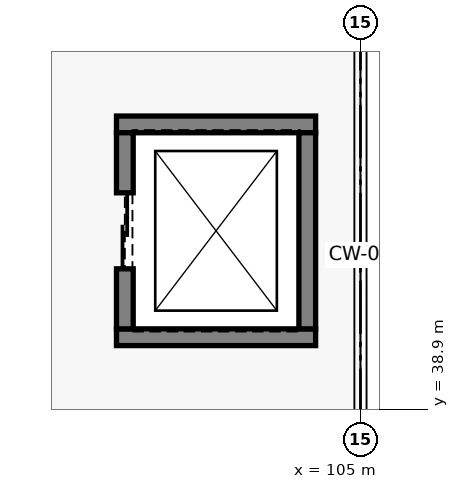
"""IFC4 building model, lengths in metres.
Left out: names, types, materials, properties, quantities, classifications, styles, units other than length and angle.
Written with IfcOpenShell. Run it as: python <this file> out.ifc"""

import sys

from ifc_helpers import new_model, si_unit, direction, frame, frame_2d, origin, place, context, subcontext, project, spatial, rectangle, extrude, element, fill, save


model = new_model("IFC4")
c1 = context("Model", 3, precision=1e-05, world=origin(), true_north=direction((0.0, 1.0)))
c2 = subcontext(c1, "Body", "Model", "MODEL_VIEW")
j1 = project(units=[si_unit("LENGTHUNIT", "METRE"), si_unit("PLANEANGLEUNIT", "RADIAN")], contexts=[c1])
p1 = place(None, origin())
s1 = spatial("IfcSite", under=j1, at=p1, CompositionType="ELEMENT")
p2 = place(p1, origin())
s2 = spatial("IfcBuilding", under=s1, at=p2, CompositionType="ELEMENT")
p3 = place(p2, frame((0.0, 0.0, 21.0)))
s3 = spatial("IfcBuildingStorey", under=s2, at=p3, CompositionType="ELEMENT", Elevation=21.0)
for number, where, z_axis, x_axis in (
    (1, (101.79, 39.85, 0.0), (0.0, 0.0, 1.0), (1.0, 0.0, 0.0)),
    (2, (101.79, 42.65, 0.0), (0.0, 0.0, 1.0), (1.0, 0.0, 0.0)),
):
    element("IfcWall", number, at=place(p3, frame(where, z_axis=z_axis, x_axis=x_axis)), inside=s3, PredefinedType="SOLIDWALL", context=c2, shape_type="SweptSolid", body=[
        extrude(rectangle(XDim=2.62, YDim=0.22, at=frame_2d((1.31, 0.0))), origin(), (0.0, 0.0, 1.0), 3.92),
    ])
p4 = place(p3, frame((101.9, 39.96, 0.0), z_axis=(0.0, 0.0, 1.0), x_axis=(0.0, 1.0, 0.0)))
e3 = element("IfcWall", 3, at=p4, inside=s3, PredefinedType="SOLIDWALL", context=c2, shape_type="SweptSolid", body=[
    extrude(rectangle(XDim=2.58, YDim=0.22, at=frame_2d((1.29, 0.0))), origin(), (0.0, 0.0, 1.0), 3.92),
])
p5 = place(p4, frame((0.79, 0.0, 0.0)))
e4 = element("IfcOpeningElement", 4, at=p5, cuts=e3, PredefinedType="OPENING", context=c2, shape_type="SweptSolid", body=[
    extrude(rectangle(XDim=1.0, YDim=2.15, at=frame_2d((0.5, 1.075))), frame((0.0, 0.12, 0.0), z_axis=(0.0, -1.0, 0.0), x_axis=(1.0, 0.0, 0.0)), (0.0, 0.0, 1.0), 0.24),
])
p6 = place(p3, frame((104.3, 39.96, 0.0), z_axis=(0.0, 0.0, 1.0), x_axis=(0.0, 1.0, 0.0)))
e5 = element("IfcWall", 5, at=p6, inside=s3, PredefinedType="SOLIDWALL", context=c2, shape_type="SweptSolid", body=[
    extrude(rectangle(XDim=2.58, YDim=0.22, at=frame_2d((1.29, 0.0))), origin(), (0.0, 0.0, 1.0), 3.92),
])
p7 = place(p5, origin())
e6 = element("IfcDoor", 6, at=p7, inside=s3, OperationType="SLIDING_TO_LEFT", PredefinedType="DOOR", context=c2, shape_type="SweptSolid", body=[
    extrude(rectangle(XDim=1.0, YDim=2.15, at=frame_2d((0.5, 1.075))), frame((0.0, 0.025, 0.0), z_axis=(0.0, -1.0, 0.0), x_axis=(1.0, 0.0, 0.0)), (0.0, 0.0, 1.0), 0.05),
])
fill(e4, e6)
save(model, sys.argv[1])
